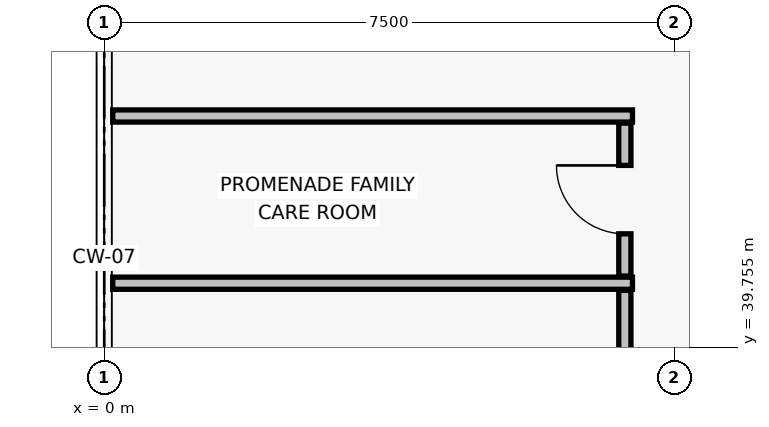
"""IFC4 building model, lengths in metres.
Left out: names, types, materials, properties, quantities, classifications, styles, units other than length and angle.
Written with IfcOpenShell. Run it as: python <this file> out.ifc"""

import sys

from ifc_helpers import new_model, si_unit, direction, frame, frame_2d, origin, place, context, subcontext, project, spatial, rectangle, extrude, element, fill, save


model = new_model("IFC4")
c1 = context("Model", 3, precision=1e-05, world=origin(), true_north=direction((0.0, 1.0)))
c2 = subcontext(c1, "Body", "Model", "MODEL_VIEW")
j1 = project(units=[si_unit("LENGTHUNIT", "METRE"), si_unit("PLANEANGLEUNIT", "RADIAN")], contexts=[c1])
p1 = place(None, origin())
s1 = spatial("IfcSite", under=j1, at=p1, CompositionType="ELEMENT")
p2 = place(p1, origin())
s2 = spatial("IfcBuilding", under=s1, at=p2, CompositionType="ELEMENT")
p3 = place(p2, frame((0.0, 0.0, 4.8)))
s3 = spatial("IfcBuildingStorey", under=s2, at=p3, CompositionType="ELEMENT", Elevation=4.8)
for number, where, z_axis, x_axis in (
    (1, (0.112, 40.6, 0.0), (0.0, 0.0, 1.0), (1.0, 0.0, 0.0)),
    (2, (0.112, 42.8, 0.0), (0.0, 0.0, 1.0), (1.0, 0.0, 0.0)),
):
    element("IfcWall", number, at=place(p3, frame(where, z_axis=z_axis, x_axis=x_axis)), inside=s3, PredefinedType="PARTITIONING", context=c2, shape_type="SweptSolid", body=[
        extrude(rectangle(XDim=6.838, YDim=0.16, at=frame_2d((3.419, 0.0))), origin(), (0.0, 0.0, 1.0), 3.14),
    ])
p4 = place(p3, frame((6.85, 37.594, 0.0), z_axis=(0.0, 0.0, 1.0), x_axis=(0.0, 1.0, 0.0)))
e3 = element("IfcWall", 3, at=p4, inside=s3, PredefinedType="PARTITIONING", context=c2, shape_type="SweptSolid", body=[
    extrude(rectangle(XDim=2.912, YDim=0.16, at=frame_2d((1.456, 0.0))), origin(), (0.0, 0.0, 1.0), 2.89),
])
p5 = place(p4, frame((0.981, 0.0, 0.0)))
e4 = element("IfcOpeningElement", 4, at=p5, cuts=e3, PredefinedType="OPENING", context=c2, shape_type="SweptSolid", body=[
    extrude(rectangle(XDim=0.95, YDim=2.1, at=frame_2d((0.475, 1.05))), frame((0.0, 0.09, 0.0), z_axis=(0.0, -1.0, 0.0), x_axis=(1.0, 0.0, 0.0)), (0.0, 0.0, 1.0), 0.18),
])
p6 = place(p3, frame((6.85, 40.694, 0.0), z_axis=(0.0, 0.0, 1.0), x_axis=(0.0, 1.0, 0.0)))
e5 = element("IfcWall", 5, at=p6, inside=s3, PredefinedType="PARTITIONING", context=c2, shape_type="SweptSolid", body=[
    extrude(rectangle(XDim=2.012, YDim=0.16, at=frame_2d((1.006, 0.0))), origin(), (0.0, 0.0, 1.0), 3.27),
])
p7 = place(p6, frame((0.556, 0.0, 0.0)))
e6 = element("IfcOpeningElement", 6, at=p7, cuts=e5, PredefinedType="OPENING", context=c2, shape_type="SweptSolid", body=[
    extrude(rectangle(XDim=0.9, YDim=2.1, at=frame_2d((0.45, 1.05))), frame((0.0, 0.09, 0.0), z_axis=(0.0, -1.0, 0.0), x_axis=(1.0, 0.0, 0.0)), (0.0, 0.0, 1.0), 0.18),
])
p8 = place(p7, origin())
e7 = element("IfcDoor", 7, at=p8, inside=s3, OperationType="SINGLE_SWING_RIGHT", PredefinedType="DOOR", context=c2, shape_type="SweptSolid", body=[
    extrude(rectangle(XDim=0.9, YDim=2.1, at=frame_2d((0.45, 1.05))), frame((0.0, 0.025, 0.0), z_axis=(0.0, -1.0, 0.0), x_axis=(1.0, 0.0, 0.0)), (0.0, 0.0, 1.0), 0.05),
])
fill(e6, e7)
save(model, sys.argv[1])
